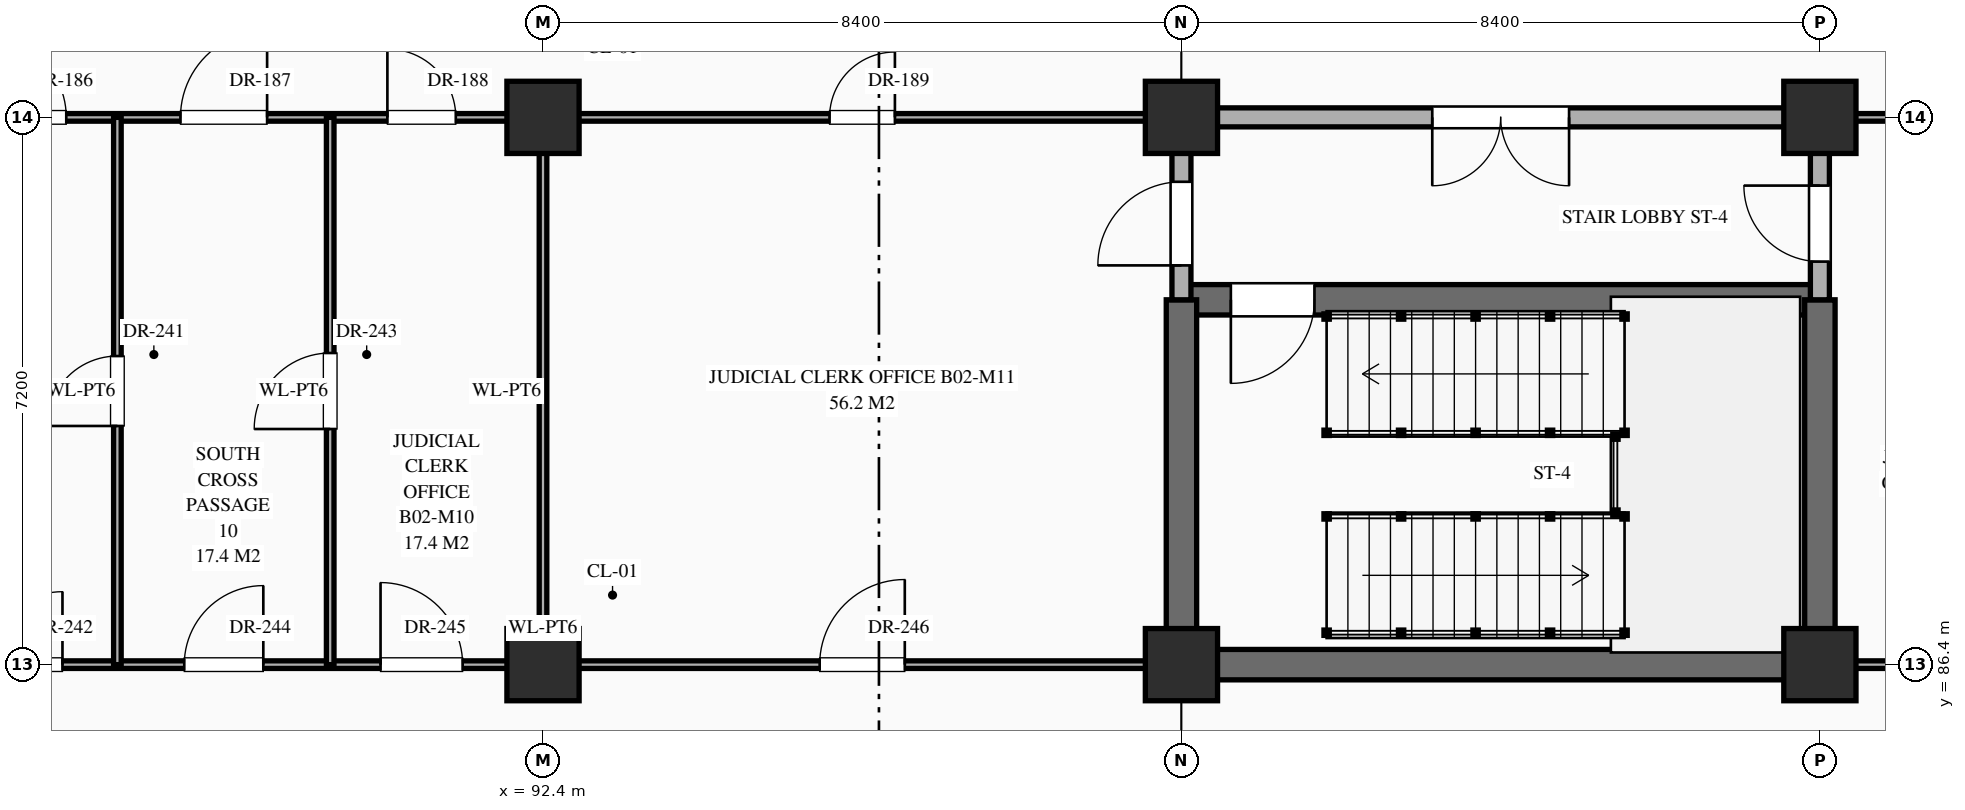
"""IFC4 building model, lengths in metres.
Left out: names, types, materials, properties, quantities, classifications, styles, units other than length and angle.
Written with IfcOpenShell. Run it as: python <this file> out.ifc"""

import sys

from ifc_helpers import new_model, si_unit, direction, frame, frame_2d, origin, origin_2d, place, context, subcontext, project, spatial, rectangle, extrude, element, fill, save


model = new_model("IFC4")
c1 = context("Model", 3, precision=1e-05, world=origin(), true_north=direction((0.0, 1.0)))
c2 = subcontext(c1, "Body", "Model", "MODEL_VIEW")
j1 = project(units=[si_unit("LENGTHUNIT", "METRE"), si_unit("PLANEANGLEUNIT", "RADIAN")], contexts=[c1])
p1 = place(None, origin())
s1 = spatial("IfcSite", under=j1, at=p1, CompositionType="ELEMENT")
p2 = place(p1, origin())
s2 = spatial("IfcBuilding", under=s1, at=p2, CompositionType="ELEMENT")
p3 = place(p2, frame((0.0, 0.0, -10.2)))
s3 = spatial("IfcBuildingStorey", under=s2, at=p3, CompositionType="ELEMENT", Elevation=-10.2)
for number, where, z_axis, x_axis in (
    (1, (92.4, 86.4, 0.0), (0.0, 0.0, 1.0), (1.0, 0.0, 0.0)),
    (2, (92.4, 93.6, 0.0), (0.0, 0.0, 1.0), (1.0, 0.0, 0.0)),
    (3, (100.8, 86.4, 0.0), (0.0, 0.0, 1.0), (1.0, 0.0, 0.0)),
    (4, (100.8, 93.6, 0.0), (0.0, 0.0, 1.0), (1.0, 0.0, 0.0)),
    (5, (109.2, 86.4, 0.0), (0.0, 0.0, 1.0), (1.0, 0.0, 0.0)),
    (6, (109.2, 93.6, 0.0), (0.0, 0.0, 1.0), (1.0, 0.0, 0.0)),
):
    element("IfcColumn", number, at=place(p3, frame(where, z_axis=z_axis, x_axis=x_axis)), inside=s3, PredefinedType="COLUMN", context=c2, shape_type="SweptSolid", body=[
        extrude(rectangle(XDim=0.95, YDim=0.95, at=origin_2d()), origin(), (0.0, 0.0, 1.0), 4.8),
    ])
p4 = place(p3, frame((84.0, 86.4, 0.0), z_axis=(0.0, 0.0, 1.0), x_axis=(1.0, 0.0, 0.0)))
e7 = element("IfcWall", 7, at=p4, inside=s3, PredefinedType="STANDARD", context=c2, shape_type="SweptSolid", body=[
    extrude(rectangle(XDim=16.8, YDim=0.1, at=frame_2d((8.4, 0.0))), origin(), (0.0, 0.0, 1.0), 3.63),
])
p5 = place(p4, frame((1.117, 0.0, 0.0)))
e8 = element("IfcOpeningElement", 8, at=p5, cuts=e7, PredefinedType="OPENING", context=c2, shape_type="SweptSolid", body=[
    extrude(rectangle(XDim=0.96, YDim=2.2, at=frame_2d((0.48, 1.1))), frame((0.0, 0.062, 0.0), z_axis=(0.0, -1.0, 0.0), x_axis=(1.0, 0.0, 0.0)), (0.0, 0.0, 1.0), 0.124),
])
p6 = place(p4, frame((3.68, 0.0, 0.0)))
e9 = element("IfcOpeningElement", 9, at=p6, cuts=e7, PredefinedType="OPENING", context=c2, shape_type="SweptSolid", body=[
    extrude(rectangle(XDim=1.04, YDim=2.2, at=frame_2d((0.52, 1.1))), frame((0.0, 0.062, 0.0), z_axis=(0.0, -1.0, 0.0), x_axis=(1.0, 0.0, 0.0)), (0.0, 0.0, 1.0), 0.124),
])
p7 = place(p4, frame((6.262, 0.0, 0.0)))
e10 = element("IfcOpeningElement", 10, at=p7, cuts=e7, PredefinedType="OPENING", context=c2, shape_type="SweptSolid", body=[
    extrude(rectangle(XDim=1.08, YDim=2.25, at=frame_2d((0.54, 1.125))), frame((0.0, 0.062, 0.0), z_axis=(0.0, -1.0, 0.0), x_axis=(1.0, 0.0, 0.0)), (0.0, 0.0, 1.0), 0.124),
])
p8 = place(p4, frame((12.04, 0.0, 0.0)))
e11 = element("IfcOpeningElement", 11, at=p8, cuts=e7, PredefinedType="OPENING", context=c2, shape_type="SweptSolid", body=[
    extrude(rectangle(XDim=1.12, YDim=2.25, at=frame_2d((0.56, 1.125))), frame((0.0, 0.062, 0.0), z_axis=(0.0, -1.0, 0.0), x_axis=(1.0, 0.0, 0.0)), (0.0, 0.0, 1.0), 0.124),
])
p9 = place(p3, frame((100.8, 86.4, 0.0), z_axis=(0.0, 0.0, 1.0), x_axis=(1.0, 0.0, 0.0)))
e12 = element("IfcWall", 12, at=p9, inside=s3, PredefinedType="SHEAR", context=c2, shape_type="SweptSolid", body=[
    extrude(rectangle(XDim=8.4, YDim=0.4, at=frame_2d((4.2, 0.0))), origin(), (0.0, 0.0, 1.0), 4.48),
])
p10 = place(p3, frame((109.2, 86.4, 0.0), z_axis=(0.0, 0.0, 1.0), x_axis=(1.0, 0.0, 0.0)))
e13 = element("IfcWall", 13, at=p10, inside=s3, PredefinedType="STANDARD", context=c2, shape_type="SweptSolid", body=[
    extrude(rectangle(XDim=8.4, YDim=0.1, at=frame_2d((4.2, 0.0))), origin(), (0.0, 0.0, 1.0), 3.63),
])
p11 = place(p10, frame((0.998, 0.0, 0.0)))
e14 = element("IfcOpeningElement", 14, at=p11, cuts=e13, PredefinedType="OPENING", context=c2, shape_type="SweptSolid", body=[
    extrude(rectangle(XDim=1.2, YDim=2.35, at=frame_2d((0.6, 1.175))), frame((0.0, 0.062, 0.0), z_axis=(0.0, -1.0, 0.0), x_axis=(1.0, 0.0, 0.0)), (0.0, 0.0, 1.0), 0.124),
])
p12 = place(p10, frame((3.56, 0.0, 0.0)))
e15 = element("IfcOpeningElement", 15, at=p12, cuts=e13, PredefinedType="OPENING", context=c2, shape_type="SweptSolid", body=[
    extrude(rectangle(XDim=1.28, YDim=2.35, at=frame_2d((0.64, 1.175))), frame((0.0, 0.062, 0.0), z_axis=(0.0, -1.0, 0.0), x_axis=(1.0, 0.0, 0.0)), (0.0, 0.0, 1.0), 0.124),
])
p13 = place(p10, frame((6.333, 0.0, 0.0)))
e16 = element("IfcOpeningElement", 16, at=p13, cuts=e13, PredefinedType="OPENING", context=c2, shape_type="SweptSolid", body=[
    extrude(rectangle(XDim=0.94, YDim=2.3, at=frame_2d((0.47, 1.15))), frame((0.0, 0.062, 0.0), z_axis=(0.0, -1.0, 0.0), x_axis=(1.0, 0.0, 0.0)), (0.0, 0.0, 1.0), 0.124),
])
p14 = place(p3, frame((100.8, 91.2, 0.0), z_axis=(0.0, 0.0, 1.0), x_axis=(1.0, 0.0, 0.0)))
e17 = element("IfcWall", 17, at=p14, inside=s3, PredefinedType="SHEAR", context=c2, shape_type="SweptSolid", body=[
    extrude(rectangle(XDim=8.4, YDim=0.4, at=frame_2d((4.2, 0.0))), origin(), (0.0, 0.0, 1.0), 4.48),
])
p15 = place(p14, frame((0.65, 0.0, 0.0)))
e18 = element("IfcOpeningElement", 18, at=p15, cuts=e17, PredefinedType="OPENING", context=c2, shape_type="SweptSolid", body=[
    extrude(rectangle(XDim=1.1, YDim=2.2, at=frame_2d((0.55, 1.1))), frame((0.0, 0.212, 0.0), z_axis=(0.0, -1.0, 0.0), x_axis=(1.0, 0.0, 0.0)), (0.0, 0.0, 1.0), 0.424),
])
p16 = place(p3, frame((67.2, 93.6, 0.0), z_axis=(0.0, 0.0, 1.0), x_axis=(1.0, 0.0, 0.0)))
e19 = element("IfcWall", 19, at=p16, inside=s3, PredefinedType="STANDARD", context=c2, shape_type="SweptSolid", body=[
    extrude(rectangle(XDim=33.6, YDim=0.1, at=frame_2d((16.8, 0.0))), origin(), (0.0, 0.0, 1.0), 3.63),
])
p17 = place(p16, frame((11.65, 0.0, 0.0)))
e20 = element("IfcOpeningElement", 20, at=p17, cuts=e19, PredefinedType="OPENING", context=c2, shape_type="SweptSolid", body=[
    extrude(rectangle(XDim=1.9, YDim=2.5, at=frame_2d((0.95, 1.25))), frame((0.0, 0.062, 0.0), z_axis=(0.0, -1.0, 0.0), x_axis=(1.0, 0.0, 0.0)), (0.0, 0.0, 1.0), 0.124),
])
p18 = place(p16, frame((3.68, 0.0, 0.0)))
e21 = element("IfcOpeningElement", 21, at=p18, cuts=e19, PredefinedType="OPENING", context=c2, shape_type="SweptSolid", body=[
    extrude(rectangle(XDim=1.04, YDim=2.2, at=frame_2d((0.52, 1.1))), frame((0.0, 0.062, 0.0), z_axis=(0.0, -1.0, 0.0), x_axis=(1.0, 0.0, 0.0)), (0.0, 0.0, 1.0), 0.124),
])
p19 = place(p16, frame((17.867, 0.0, 0.0)))
e22 = element("IfcOpeningElement", 22, at=p19, cuts=e19, PredefinedType="OPENING", context=c2, shape_type="SweptSolid", body=[
    extrude(rectangle(XDim=1.06, YDim=2.4, at=frame_2d((0.53, 1.2))), frame((0.0, 0.062, 0.0), z_axis=(0.0, -1.0, 0.0), x_axis=(1.0, 0.0, 0.0)), (0.0, 0.0, 1.0), 0.124),
])
p20 = place(p16, frame((20.43, 0.0, 0.0)))
e23 = element("IfcOpeningElement", 23, at=p20, cuts=e19, PredefinedType="OPENING", context=c2, shape_type="SweptSolid", body=[
    extrude(rectangle(XDim=1.14, YDim=2.4, at=frame_2d((0.57, 1.2))), frame((0.0, 0.062, 0.0), z_axis=(0.0, -1.0, 0.0), x_axis=(1.0, 0.0, 0.0)), (0.0, 0.0, 1.0), 0.124),
])
p21 = place(p16, frame((23.153, 0.0, 0.0)))
e24 = element("IfcOpeningElement", 24, at=p21, cuts=e19, PredefinedType="OPENING", context=c2, shape_type="SweptSolid", body=[
    extrude(rectangle(XDim=0.9, YDim=2.15, at=frame_2d((0.45, 1.075))), frame((0.0, 0.062, 0.0), z_axis=(0.0, -1.0, 0.0), x_axis=(1.0, 0.0, 0.0)), (0.0, 0.0, 1.0), 0.124),
])
p22 = place(p16, frame((28.97, 0.0, 0.0)))
e25 = element("IfcOpeningElement", 25, at=p22, cuts=e19, PredefinedType="OPENING", context=c2, shape_type="SweptSolid", body=[
    extrude(rectangle(XDim=0.86, YDim=2.1, at=frame_2d((0.43, 1.05))), frame((0.0, 0.062, 0.0), z_axis=(0.0, -1.0, 0.0), x_axis=(1.0, 0.0, 0.0)), (0.0, 0.0, 1.0), 0.124),
])
p23 = place(p3, frame((100.8, 93.6, 0.0), z_axis=(0.0, 0.0, 1.0), x_axis=(1.0, 0.0, 0.0)))
e26 = element("IfcWall", 26, at=p23, inside=s3, PredefinedType="STANDARD", context=c2, shape_type="SweptSolid", body=[
    extrude(rectangle(XDim=8.4, YDim=0.25, at=frame_2d((4.2, 0.0))), origin(), (0.0, 0.0, 1.0), 3.63),
])
p24 = place(p23, frame((3.3, 0.0, 0.0)))
e27 = element("IfcOpeningElement", 27, at=p24, cuts=e26, PredefinedType="OPENING", context=c2, shape_type="SweptSolid", body=[
    extrude(rectangle(XDim=1.8, YDim=2.35, at=frame_2d((0.9, 1.175))), frame((0.0, 0.137, 0.0), z_axis=(0.0, -1.0, 0.0), x_axis=(1.0, 0.0, 0.0)), (0.0, 0.0, 1.0), 0.274),
])
p25 = place(p3, frame((109.2, 93.6, 0.0), z_axis=(0.0, 0.0, 1.0), x_axis=(1.0, 0.0, 0.0)))
e28 = element("IfcWall", 28, at=p25, inside=s3, PredefinedType="STANDARD", context=c2, shape_type="SweptSolid", body=[
    extrude(rectangle(XDim=8.4, YDim=0.1, at=frame_2d((4.2, 0.0))), origin(), (0.0, 0.0, 1.0), 3.63),
])
p26 = place(p25, frame((1.137, 0.0, 0.0)))
e29 = element("IfcOpeningElement", 29, at=p26, cuts=e28, PredefinedType="OPENING", context=c2, shape_type="SweptSolid", body=[
    extrude(rectangle(XDim=0.92, YDim=2.15, at=frame_2d((0.46, 1.075))), frame((0.0, 0.062, 0.0), z_axis=(0.0, -1.0, 0.0), x_axis=(1.0, 0.0, 0.0)), (0.0, 0.0, 1.0), 0.124),
])
p27 = place(p25, frame((3.72, 0.0, 0.0)))
e30 = element("IfcOpeningElement", 30, at=p27, cuts=e28, PredefinedType="OPENING", context=c2, shape_type="SweptSolid", body=[
    extrude(rectangle(XDim=0.96, YDim=2.2, at=frame_2d((0.48, 1.1))), frame((0.0, 0.062, 0.0), z_axis=(0.0, -1.0, 0.0), x_axis=(1.0, 0.0, 0.0)), (0.0, 0.0, 1.0), 0.124),
])
p28 = place(p25, frame((6.302, 0.0, 0.0)))
e31 = element("IfcOpeningElement", 31, at=p28, cuts=e28, PredefinedType="OPENING", context=c2, shape_type="SweptSolid", body=[
    extrude(rectangle(XDim=1.0, YDim=2.25, at=frame_2d((0.5, 1.125))), frame((0.0, 0.062, 0.0), z_axis=(0.0, -1.0, 0.0), x_axis=(1.0, 0.0, 0.0)), (0.0, 0.0, 1.0), 0.124),
])
p29 = place(p3, frame((86.8, 86.4, 0.0), z_axis=(0.0, 0.0, 1.0), x_axis=(0.0, 1.0, 0.0)))
e32 = element("IfcWall", 32, at=p29, inside=s3, PredefinedType="STANDARD", context=c2, shape_type="SweptSolid", body=[
    extrude(rectangle(XDim=7.2, YDim=0.1, at=frame_2d((3.6, 0.0))), origin(), (0.0, 0.0, 1.0), 4.48),
])
p30 = place(p29, frame((3.14, 0.0, 0.0)))
e33 = element("IfcOpeningElement", 33, at=p30, cuts=e32, PredefinedType="OPENING", context=c2, shape_type="SweptSolid", body=[
    extrude(rectangle(XDim=0.92, YDim=2.15, at=frame_2d((0.46, 1.075))), frame((0.0, 0.062, 0.0), z_axis=(0.0, -1.0, 0.0), x_axis=(1.0, 0.0, 0.0)), (0.0, 0.0, 1.0), 0.124),
])
p31 = place(p3, frame((89.6, 86.4, 0.0), z_axis=(0.0, 0.0, 1.0), x_axis=(0.0, 1.0, 0.0)))
e34 = element("IfcWall", 34, at=p31, inside=s3, PredefinedType="STANDARD", context=c2, shape_type="SweptSolid", body=[
    extrude(rectangle(XDim=7.2, YDim=0.1, at=frame_2d((3.6, 0.0))), origin(), (0.0, 0.0, 1.0), 4.48),
])
p32 = place(p31, frame((3.1, 0.0, 0.0)))
e35 = element("IfcOpeningElement", 35, at=p32, cuts=e34, PredefinedType="OPENING", context=c2, shape_type="SweptSolid", body=[
    extrude(rectangle(XDim=1.0, YDim=2.25, at=frame_2d((0.5, 1.125))), frame((0.0, 0.062, 0.0), z_axis=(0.0, -1.0, 0.0), x_axis=(1.0, 0.0, 0.0)), (0.0, 0.0, 1.0), 0.124),
])
p33 = place(p3, frame((92.4, 86.4, 0.0), z_axis=(0.0, 0.0, 1.0), x_axis=(0.0, 1.0, 0.0)))
e36 = element("IfcWall", 36, at=p33, inside=s3, PredefinedType="STANDARD", context=c2, shape_type="SweptSolid", body=[
    extrude(rectangle(XDim=7.2, YDim=0.1, at=frame_2d((3.6, 0.0))), origin(), (0.0, 0.0, 1.0), 3.73),
])
p34 = place(p3, frame((100.8, 86.4, 0.0), z_axis=(0.0, 0.0, 1.0), x_axis=(0.0, 1.0, 0.0)))
e37 = element("IfcWall", 37, at=p34, inside=s3, PredefinedType="SHEAR", context=c2, shape_type="SweptSolid", body=[
    extrude(rectangle(XDim=4.8, YDim=0.4, at=frame_2d((2.4, 0.0))), origin(), (0.0, 0.0, 1.0), 4.48),
])
p35 = place(p3, frame((100.8, 91.2, 0.0), z_axis=(0.0, 0.0, 1.0), x_axis=(0.0, 1.0, 0.0)))
e38 = element("IfcWall", 38, at=p35, inside=s3, PredefinedType="STANDARD", context=c2, shape_type="SweptSolid", body=[
    extrude(rectangle(XDim=2.4, YDim=0.25, at=frame_2d((1.2, 0.0))), origin(), (0.0, 0.0, 1.0), 3.73),
])
p36 = place(p35, frame((0.452, 0.0, 0.0)))
e39 = element("IfcOpeningElement", 39, at=p36, cuts=e38, PredefinedType="OPENING", context=c2, shape_type="SweptSolid", body=[
    extrude(rectangle(XDim=1.1, YDim=2.2, at=frame_2d((0.55, 1.1))), frame((0.0, 0.137, 0.0), z_axis=(0.0, -1.0, 0.0), x_axis=(1.0, 0.0, 0.0)), (0.0, 0.0, 1.0), 0.274),
])
p37 = place(p3, frame((109.2, 86.4, 0.0), z_axis=(0.0, 0.0, 1.0), x_axis=(0.0, 1.0, 0.0)))
e40 = element("IfcWall", 40, at=p37, inside=s3, PredefinedType="SHEAR", context=c2, shape_type="SweptSolid", body=[
    extrude(rectangle(XDim=4.8, YDim=0.4, at=frame_2d((2.4, 0.0))), origin(), (0.0, 0.0, 1.0), 4.48),
])
p38 = place(p3, frame((109.2, 91.2, 0.0), z_axis=(0.0, 0.0, 1.0), x_axis=(0.0, 1.0, 0.0)))
e41 = element("IfcWall", 41, at=p38, inside=s3, PredefinedType="STANDARD", context=c2, shape_type="SweptSolid", body=[
    extrude(rectangle(XDim=2.4, YDim=0.25, at=frame_2d((1.2, 0.0))), origin(), (0.0, 0.0, 1.0), 3.73),
])
p39 = place(p38, frame((0.502, 0.0, 0.0)))
e42 = element("IfcOpeningElement", 42, at=p39, cuts=e41, PredefinedType="OPENING", context=c2, shape_type="SweptSolid", body=[
    extrude(rectangle(XDim=1.0, YDim=2.2, at=frame_2d((0.5, 1.1))), frame((0.0, 0.137, 0.0), z_axis=(0.0, -1.0, 0.0), x_axis=(1.0, 0.0, 0.0)), (0.0, 0.0, 1.0), 0.274),
])
p40 = place(p15, frame((1.1, 0.0, 0.0), z_axis=(0.0, 0.0, 1.0), x_axis=(-1.0, 0.0, 0.0)))
e43 = element("IfcDoor", 43, at=p40, inside=s3, OperationType="SINGLE_SWING_RIGHT", PredefinedType="DOOR", context=c2, shape_type="SweptSolid", body=[
    extrude(rectangle(XDim=1.1, YDim=2.2, at=frame_2d((0.55, 1.1))), frame((0.0, 0.025, 0.0), z_axis=(0.0, -1.0, 0.0), x_axis=(1.0, 0.0, 0.0)), (0.0, 0.0, 1.0), 0.05),
])
fill(e18, e43)
p41 = place(p24, frame((1.8, 0.0, 0.0), z_axis=(0.0, 0.0, 1.0), x_axis=(-1.0, 0.0, 0.0)))
e44 = element("IfcDoor", 44, at=p41, inside=s3, OperationType="DOUBLE_DOOR_SINGLE_SWING", PredefinedType="DOOR", context=c2, shape_type="SweptSolid", body=[
    extrude(rectangle(XDim=1.8, YDim=2.35, at=frame_2d((0.9, 1.175))), frame((0.0, 0.025, 0.0), z_axis=(0.0, -1.0, 0.0), x_axis=(1.0, 0.0, 0.0)), (0.0, 0.0, 1.0), 0.05),
])
fill(e27, e44)
p42 = place(p36, origin())
e45 = element("IfcDoor", 45, at=p42, inside=s3, OperationType="SINGLE_SWING_LEFT", PredefinedType="DOOR", context=c2, shape_type="SweptSolid", body=[
    extrude(rectangle(XDim=1.1, YDim=2.2, at=frame_2d((0.55, 1.1))), frame((0.0, 0.025, 0.0), z_axis=(0.0, -1.0, 0.0), x_axis=(1.0, 0.0, 0.0)), (0.0, 0.0, 1.0), 0.05),
])
fill(e39, e45)
p43 = place(p39, origin())
e46 = element("IfcDoor", 46, at=p43, inside=s3, OperationType="SINGLE_SWING_RIGHT", PredefinedType="DOOR", context=c2, shape_type="SweptSolid", body=[
    extrude(rectangle(XDim=1.0, YDim=2.2, at=frame_2d((0.5, 1.1))), frame((0.0, 0.025, 0.0), z_axis=(0.0, -1.0, 0.0), x_axis=(1.0, 0.0, 0.0)), (0.0, 0.0, 1.0), 0.05),
])
fill(e42, e46)
p44 = place(p19, origin())
e47 = element("IfcDoor", 47, at=p44, inside=s3, OperationType="SINGLE_SWING_LEFT", PredefinedType="DOOR", context=c2, shape_type="SweptSolid", body=[
    extrude(rectangle(XDim=1.06, YDim=2.4, at=frame_2d((0.53, 1.2))), frame((0.0, 0.025, 0.0), z_axis=(0.0, -1.0, 0.0), x_axis=(1.0, 0.0, 0.0)), (0.0, 0.0, 1.0), 0.05),
])
fill(e22, e47)
p45 = place(p20, origin())
e48 = element("IfcDoor", 48, at=p45, inside=s3, OperationType="SINGLE_SWING_RIGHT", PredefinedType="DOOR", context=c2, shape_type="SweptSolid", body=[
    extrude(rectangle(XDim=1.14, YDim=2.4, at=frame_2d((0.57, 1.2))), frame((0.0, 0.025, 0.0), z_axis=(0.0, -1.0, 0.0), x_axis=(1.0, 0.0, 0.0)), (0.0, 0.0, 1.0), 0.05),
])
fill(e23, e48)
p46 = place(p21, origin())
e49 = element("IfcDoor", 49, at=p46, inside=s3, OperationType="SINGLE_SWING_LEFT", PredefinedType="DOOR", context=c2, shape_type="SweptSolid", body=[
    extrude(rectangle(XDim=0.9, YDim=2.15, at=frame_2d((0.45, 1.075))), frame((0.0, 0.025, 0.0), z_axis=(0.0, -1.0, 0.0), x_axis=(1.0, 0.0, 0.0)), (0.0, 0.0, 1.0), 0.05),
])
fill(e24, e49)
p47 = place(p22, origin())
e50 = element("IfcDoor", 50, at=p47, inside=s3, OperationType="SINGLE_SWING_RIGHT", PredefinedType="DOOR", context=c2, shape_type="SweptSolid", body=[
    extrude(rectangle(XDim=0.86, YDim=2.1, at=frame_2d((0.43, 1.05))), frame((0.0, 0.025, 0.0), z_axis=(0.0, -1.0, 0.0), x_axis=(1.0, 0.0, 0.0)), (0.0, 0.0, 1.0), 0.05),
])
fill(e25, e50)
p48 = place(p30, origin())
e51 = element("IfcDoor", 51, at=p48, inside=s3, OperationType="SINGLE_SWING_LEFT", PredefinedType="DOOR", context=c2, shape_type="SweptSolid", body=[
    extrude(rectangle(XDim=0.92, YDim=2.15, at=frame_2d((0.46, 1.075))), frame((0.0, 0.025, 0.0), z_axis=(0.0, -1.0, 0.0), x_axis=(1.0, 0.0, 0.0)), (0.0, 0.0, 1.0), 0.05),
])
fill(e33, e51)
p49 = place(p5, origin())
e52 = element("IfcDoor", 52, at=p49, inside=s3, OperationType="SINGLE_SWING_RIGHT", PredefinedType="DOOR", context=c2, shape_type="SweptSolid", body=[
    extrude(rectangle(XDim=0.96, YDim=2.2, at=frame_2d((0.48, 1.1))), frame((0.0, 0.025, 0.0), z_axis=(0.0, -1.0, 0.0), x_axis=(1.0, 0.0, 0.0)), (0.0, 0.0, 1.0), 0.05),
])
fill(e8, e52)
p50 = place(p32, origin())
e53 = element("IfcDoor", 53, at=p50, inside=s3, OperationType="SINGLE_SWING_LEFT", PredefinedType="DOOR", context=c2, shape_type="SweptSolid", body=[
    extrude(rectangle(XDim=1.0, YDim=2.25, at=frame_2d((0.5, 1.125))), frame((0.0, 0.025, 0.0), z_axis=(0.0, -1.0, 0.0), x_axis=(1.0, 0.0, 0.0)), (0.0, 0.0, 1.0), 0.05),
])
fill(e35, e53)
p51 = place(p6, origin())
e54 = element("IfcDoor", 54, at=p51, inside=s3, OperationType="SINGLE_SWING_RIGHT", PredefinedType="DOOR", context=c2, shape_type="SweptSolid", body=[
    extrude(rectangle(XDim=1.04, YDim=2.2, at=frame_2d((0.52, 1.1))), frame((0.0, 0.025, 0.0), z_axis=(0.0, -1.0, 0.0), x_axis=(1.0, 0.0, 0.0)), (0.0, 0.0, 1.0), 0.05),
])
fill(e9, e54)
p52 = place(p7, origin())
e55 = element("IfcDoor", 55, at=p52, inside=s3, OperationType="SINGLE_SWING_LEFT", PredefinedType="DOOR", context=c2, shape_type="SweptSolid", body=[
    extrude(rectangle(XDim=1.08, YDim=2.25, at=frame_2d((0.54, 1.125))), frame((0.0, 0.025, 0.0), z_axis=(0.0, -1.0, 0.0), x_axis=(1.0, 0.0, 0.0)), (0.0, 0.0, 1.0), 0.05),
])
fill(e10, e55)
p53 = place(p8, origin())
e56 = element("IfcDoor", 56, at=p53, inside=s3, OperationType="SINGLE_SWING_RIGHT", PredefinedType="DOOR", context=c2, shape_type="SweptSolid", body=[
    extrude(rectangle(XDim=1.12, YDim=2.25, at=frame_2d((0.56, 1.125))), frame((0.0, 0.025, 0.0), z_axis=(0.0, -1.0, 0.0), x_axis=(1.0, 0.0, 0.0)), (0.0, 0.0, 1.0), 0.05),
])
fill(e11, e56)
save(model, sys.argv[1])
